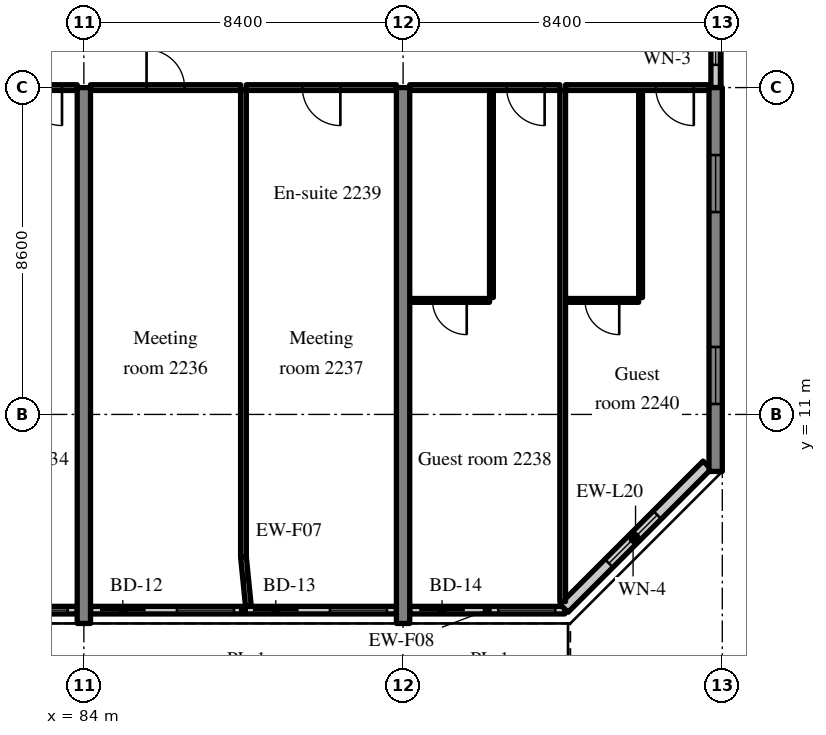
"""IFC4 building model, lengths in metres.
Left out: names, types, materials, properties, quantities, classifications, styles, units other than length and angle.
Written with IfcOpenShell. Run it as: python <this file> out.ifc"""

import sys

from ifc_helpers import new_model, si_unit, direction, frame, frame_2d, origin, place, context, subcontext, project, spatial, rectangle, extrude, source, transform, mapped, element, fill, save


model = new_model("IFC4")
c1 = context("Model", 3, precision=1e-05, world=origin(), true_north=direction((0.0, 1.0)))
c2 = subcontext(c1, "Body", "Model", "MODEL_VIEW")
j1 = project(units=[si_unit("LENGTHUNIT", "METRE"), si_unit("PLANEANGLEUNIT", "RADIAN")], contexts=[c1])
p1 = place(None, origin())
s1 = spatial("IfcSite", under=j1, at=p1, CompositionType="ELEMENT")
p2 = place(p1, origin())
s2 = spatial("IfcBuilding", under=s1, at=p2, CompositionType="ELEMENT")
p3 = place(p2, frame((0.0, 0.0, 95.2)))
s3 = spatial("IfcBuildingStorey", under=s2, at=p3, CompositionType="ELEMENT", Elevation=95.2)
m1 = source(origin(), c2, "Body", "SweptSolid", [
    extrude(rectangle(XDim=14.1, YDim=0.35, at=frame_2d((7.05, 0.0))), origin(), (0.0, 0.0, 1.0), 3.52),
])
for number, where, z_axis, x_axis in (
    (1, (84.0, 5.5, 0.0), (0.0, 0.0, 1.0), (0.0, 1.0, 0.0)),
    (2, (92.4, 5.5, 0.0), (0.0, 0.0, 1.0), (0.0, 1.0, 0.0)),
):
    element("IfcWall", number, at=place(p3, frame(where, z_axis=z_axis, x_axis=x_axis)), inside=s3, PredefinedType="SHEAR", context=c2, shape_type="MappedRepresentation", body=[
        mapped(m1, transform((0.0, 0.0, 0.0), scale=1.0)),
    ])
m2 = source(origin(), c2, "Body", "SweptSolid", [
    extrude(rectangle(XDim=10.1, YDim=0.35, at=frame_2d((5.05, 0.0))), origin(), (0.0, 0.0, 1.0), 3.52),
])
p4 = place(p3, frame((100.625, 9.5, 0.0), z_axis=(0.0, 0.0, 1.0), x_axis=(0.0, 1.0, 0.0)))
e3 = element("IfcWall", 3, at=p4, inside=s3, PredefinedType="SHEAR", context=c2, shape_type="MappedRepresentation", body=[
    mapped(m2, transform((0.0, 0.0, 0.0), scale=1.0)),
])
m3 = source(origin(), c2, "Body", "SweptSolid", [
    extrude(rectangle(XDim=1.5, YDim=1.5, at=frame_2d((0.75, 0.75))), frame((0.0, 0.185, 0.0), z_axis=(0.0, -1.0, 0.0), x_axis=(1.0, 0.0, 0.0)), (0.0, 0.0, 1.0), 0.37),
])
p5 = place(p4, frame((1.775, 0.0, 0.9)))
e4 = element("IfcOpeningElement", 4, at=p5, cuts=e3, PredefinedType="OPENING", context=c2, shape_type="MappedRepresentation", body=[
    mapped(m3, transform((0.0, 0.0, 0.0), scale=1.0)),
])
p6 = place(p4, frame((6.825, 0.0, 0.9)))
e5 = element("IfcOpeningElement", 5, at=p6, cuts=e3, PredefinedType="OPENING", context=c2, shape_type="MappedRepresentation", body=[
    mapped(m3, transform((0.0, 0.0, 0.0), scale=1.0)),
])
m4 = source(origin(), c2, "Body", "SweptSolid", [
    extrude(rectangle(XDim=8.05, YDim=0.2, at=frame_2d((4.025, 0.0))), origin(), (0.0, 0.0, 1.0), 2.82),
])
p7 = place(p3, frame((75.775, 5.85, 0.0), z_axis=(0.0, 0.0, 1.0), x_axis=(1.0, 0.0, 0.0)))
e6 = element("IfcWall", 6, at=p7, inside=s3, PredefinedType="SOLIDWALL", context=c2, shape_type="MappedRepresentation", body=[
    mapped(m4, transform((0.0, 0.0, 0.0), scale=1.0)),
])
m5 = source(origin(), c2, "Body", "SweptSolid", [
    extrude(rectangle(XDim=1.2, YDim=2.4, at=frame_2d((0.6, 1.2))), frame((0.0, 0.11, 0.0), z_axis=(0.0, -1.0, 0.0), x_axis=(1.0, 0.0, 0.0)), (0.0, 0.0, 1.0), 0.22),
])
p8 = place(p7, frame((0.25, 0.0, 0.0)))
e7 = element("IfcOpeningElement", 7, at=p8, cuts=e6, PredefinedType="OPENING", context=c2, shape_type="MappedRepresentation", body=[
    mapped(m5, transform((0.0, 0.0, 0.0), scale=1.0)),
])
m6 = source(origin(), c2, "Body", "SweptSolid", [
    extrude(rectangle(XDim=1.5, YDim=1.5, at=frame_2d((0.75, 0.75))), frame((0.0, 0.11, 0.0), z_axis=(0.0, -1.0, 0.0), x_axis=(1.0, 0.0, 0.0)), (0.0, 0.0, 1.0), 0.22),
])
p9 = place(p7, frame((2.275, 0.0, 0.9)))
e8 = element("IfcOpeningElement", 8, at=p9, cuts=e6, PredefinedType="OPENING", context=c2, shape_type="MappedRepresentation", body=[
    mapped(m6, transform((0.0, 0.0, 0.0), scale=1.0)),
])
p10 = place(p7, frame((4.275, 0.0, 0.0)))
e9 = element("IfcOpeningElement", 9, at=p10, cuts=e6, PredefinedType="OPENING", context=c2, shape_type="MappedRepresentation", body=[
    mapped(m5, transform((0.0, 0.0, 0.0), scale=1.0)),
])
p11 = place(p7, frame((6.3, 0.0, 0.9)))
e10 = element("IfcOpeningElement", 10, at=p11, cuts=e6, PredefinedType="OPENING", context=c2, shape_type="MappedRepresentation", body=[
    mapped(m6, transform((0.0, 0.0, 0.0), scale=1.0)),
])
p12 = place(p3, frame((84.175, 5.85, 0.0), z_axis=(0.0, 0.0, 1.0), x_axis=(1.0, 0.0, 0.0)))
e11 = element("IfcWall", 11, at=p12, inside=s3, PredefinedType="SOLIDWALL", context=c2, shape_type="MappedRepresentation", body=[
    mapped(m4, transform((0.0, 0.0, 0.0), scale=1.0)),
])
p13 = place(p12, frame((0.25, 0.0, 0.0)))
e12 = element("IfcOpeningElement", 12, at=p13, cuts=e11, PredefinedType="OPENING", context=c2, shape_type="MappedRepresentation", body=[
    mapped(m5, transform((0.0, 0.0, 0.0), scale=1.0)),
])
p14 = place(p12, frame((2.275, 0.0, 0.9)))
e13 = element("IfcOpeningElement", 13, at=p14, cuts=e11, PredefinedType="OPENING", context=c2, shape_type="MappedRepresentation", body=[
    mapped(m6, transform((0.0, 0.0, 0.0), scale=1.0)),
])
p15 = place(p12, frame((4.275, 0.0, 0.0)))
e14 = element("IfcOpeningElement", 14, at=p15, cuts=e11, PredefinedType="OPENING", context=c2, shape_type="MappedRepresentation", body=[
    mapped(m5, transform((0.0, 0.0, 0.0), scale=1.0)),
])
p16 = place(p12, frame((6.3, 0.0, 0.9)))
e15 = element("IfcOpeningElement", 15, at=p16, cuts=e11, PredefinedType="OPENING", context=c2, shape_type="MappedRepresentation", body=[
    mapped(m6, transform((0.0, 0.0, 0.0), scale=1.0)),
])
m7 = source(origin(), c2, "Body", "SweptSolid", [
    extrude(rectangle(XDim=4.08, YDim=0.2, at=frame_2d((2.04, 0.0))), origin(), (0.0, 0.0, 1.0), 2.82),
])
p17 = place(p3, frame((92.575, 5.85, 0.0), z_axis=(0.0, 0.0, 1.0), x_axis=(1.0, 0.0, 0.0)))
e16 = element("IfcWall", 16, at=p17, inside=s3, PredefinedType="SOLIDWALL", context=c2, shape_type="MappedRepresentation", body=[
    mapped(m7, transform((0.0, 0.0, 0.0), scale=1.0)),
])
p18 = place(p17, frame((0.25, 0.0, 0.0)))
e17 = element("IfcOpeningElement", 17, at=p18, cuts=e16, PredefinedType="OPENING", context=c2, shape_type="MappedRepresentation", body=[
    mapped(m5, transform((0.0, 0.0, 0.0), scale=1.0)),
])
p19 = place(p17, frame((2.33, 0.0, 0.9)))
e18 = element("IfcOpeningElement", 18, at=p19, cuts=e16, PredefinedType="OPENING", context=c2, shape_type="MappedRepresentation", body=[
    mapped(m6, transform((0.0, 0.0, 0.0), scale=1.0)),
])
m8 = source(origin(), c2, "Body", "SweptSolid", [
    extrude(rectangle(XDim=5.326, YDim=0.3, at=frame_2d((2.663, 0.0))), origin(), (0.0, 0.0, 1.0), 3.52),
])
p20 = place(p3, frame((96.634, 5.9, 0.0), z_axis=(0.0, 0.0, 1.0), x_axis=(0.707083859269, 0.707129702361, 0.0)))
e19 = element("IfcWall", 19, at=p20, inside=s3, PredefinedType="SOLIDWALL", context=c2, shape_type="MappedRepresentation", body=[
    mapped(m8, transform((0.0, 0.0, 0.0), scale=1.0)),
])
m9 = source(origin(), c2, "Body", "SweptSolid", [
    extrude(rectangle(XDim=1.8, YDim=1.5, at=frame_2d((0.9, 0.75))), frame((0.0, 0.16, 0.0), z_axis=(0.0, -1.0, 0.0), x_axis=(1.0, 0.0, 0.0)), (0.0, 0.0, 1.0), 0.32),
])
p21 = place(p20, frame((1.672, 0.0, 0.9)))
e20 = element("IfcOpeningElement", 20, at=p21, cuts=e19, PredefinedType="OPENING", context=c2, shape_type="MappedRepresentation", body=[
    mapped(m9, transform((0.0, 0.0, 0.0), scale=1.0)),
])
m10 = source(origin(), c2, "Body", "SweptSolid", [
    extrude(rectangle(XDim=2.4, YDim=0.25, at=frame_2d((1.2, 0.0))), origin(), (0.0, 0.0, 1.0), 2.62),
])
p22 = place(p3, frame((100.625, 19.6, 0.0), z_axis=(0.0, 0.0, 1.0), x_axis=(0.0, 1.0, 0.0)))
e21 = element("IfcWall", 21, at=p22, inside=s3, PredefinedType="SOLIDWALL", context=c2, shape_type="MappedRepresentation", body=[
    mapped(m10, transform((0.0, 0.0, 0.0), scale=1.0)),
])
m11 = source(origin(), c2, "Body", "SweptSolid", [
    extrude(rectangle(XDim=1.2, YDim=1.5, at=frame_2d((0.6, 0.75))), frame((0.0, 0.135, 0.0), z_axis=(0.0, -1.0, 0.0), x_axis=(1.0, 0.0, 0.0)), (0.0, 0.0, 1.0), 0.27),
])
p23 = place(p22, frame((0.6, 0.0, 0.9)))
e22 = element("IfcOpeningElement", 22, at=p23, cuts=e21, PredefinedType="OPENING", context=c2, shape_type="MappedRepresentation", body=[
    mapped(m11, transform((0.0, 0.0, 0.0), scale=1.0)),
])
m12 = source(origin(), c2, "Body", "SweptSolid", [
    extrude(rectangle(XDim=3.95, YDim=0.15, at=frame_2d((1.975, 0.0))), origin(), (0.0, 0.0, 1.0), 2.82),
])
p24 = place(p3, frame((79.875, 19.6, 0.0), z_axis=(0.0, 0.0, 1.0), x_axis=(1.0, 0.0, 0.0)))
e23 = element("IfcWall", 23, at=p24, inside=s3, PredefinedType="PARTITIONING", context=c2, shape_type="MappedRepresentation", body=[
    mapped(m12, transform((0.0, 0.0, 0.0), scale=1.0)),
])
m13 = source(origin(), c2, "Body", "SweptSolid", [
    extrude(rectangle(XDim=1.0, YDim=2.1, at=frame_2d((0.5, 1.05))), frame((0.0, 0.085, 0.0), z_axis=(0.0, -1.0, 0.0), x_axis=(1.0, 0.0, 0.0)), (0.0, 0.0, 1.0), 0.17),
])
p25 = place(p24, frame((2.55, 0.0, 0.0)))
e24 = element("IfcOpeningElement", 24, at=p25, cuts=e23, PredefinedType="OPENING", context=c2, shape_type="MappedRepresentation", body=[
    mapped(m13, transform((0.0, 0.0, 0.0), scale=1.0)),
])
p26 = place(p3, frame((84.175, 19.6, 0.0), z_axis=(0.0, 0.0, 1.0), x_axis=(1.0, 0.0, 0.0)))
e25 = element("IfcWall", 25, at=p26, inside=s3, PredefinedType="PARTITIONING", context=c2, shape_type="MappedRepresentation", body=[
    mapped(m12, transform((0.0, 0.0, 0.0), scale=1.0)),
])
p27 = place(p26, frame((1.475, 0.0, 0.0)))
e26 = element("IfcOpeningElement", 26, at=p27, cuts=e25, PredefinedType="OPENING", context=c2, shape_type="MappedRepresentation", body=[
    mapped(m13, transform((0.0, 0.0, 0.0), scale=1.0)),
])
m14 = source(origin(), c2, "Body", "SweptSolid", [
    extrude(rectangle(XDim=3.95, YDim=0.15, at=frame_2d((1.975, 0.0))), origin(), (0.0, 0.0, 1.0), 2.82),
])
p28 = place(p3, frame((88.275, 19.6, 0.0), z_axis=(0.0, 0.0, 1.0), x_axis=(1.0, 0.0, 0.0)))
e27 = element("IfcWall", 27, at=p28, inside=s3, PredefinedType="PARTITIONING", context=c2, shape_type="MappedRepresentation", body=[
    mapped(m14, transform((0.0, 0.0, 0.0), scale=1.0)),
])
p29 = place(p28, frame((1.475, 0.0, 0.0)))
e28 = element("IfcOpeningElement", 28, at=p29, cuts=e27, PredefinedType="OPENING", context=c2, shape_type="MappedRepresentation", body=[
    mapped(m13, transform((0.0, 0.0, 0.0), scale=1.0)),
])
m15 = source(origin(), c2, "Body", "SweptSolid", [
    extrude(rectangle(XDim=12.275, YDim=0.15, at=frame_2d((6.137, 0.0))), origin(), (0.0, 0.0, 1.0), 3.52),
])
p30 = place(p3, frame((88.2, 7.25, 0.0), z_axis=(0.0, 0.0, 1.0), x_axis=(0.0, 1.0, 0.0)))
e29 = element("IfcWall", 29, at=p30, inside=s3, PredefinedType="PARTITIONING", context=c2, shape_type="MappedRepresentation", body=[
    mapped(m15, transform((0.0, 0.0, 0.0), scale=1.0)),
])
m16 = source(origin(), c2, "Body", "SweptSolid", [
    extrude(rectangle(XDim=5.45, YDim=0.1, at=frame_2d((2.725, 0.0))), origin(), (0.0, 0.0, 1.0), 3.52),
])
p31 = place(p3, frame((94.725, 14.075, 0.0), z_axis=(0.0, 0.0, 1.0), x_axis=(0.0, 1.0, 0.0)))
e30 = element("IfcWall", 30, at=p31, inside=s3, PredefinedType="PARTITIONING", context=c2, shape_type="MappedRepresentation", body=[
    mapped(m16, transform((0.0, 0.0, 0.0), scale=1.0)),
])
m17 = source(origin(), c2, "Body", "SweptSolid", [
    extrude(rectangle(XDim=2.1, YDim=0.1, at=frame_2d((1.05, 0.0))), origin(), (0.0, 0.0, 1.0), 3.52),
])
p32 = place(p3, frame((92.575, 14.0, 0.0), z_axis=(0.0, 0.0, 1.0), x_axis=(1.0, 0.0, 0.0)))
e31 = element("IfcWall", 31, at=p32, inside=s3, PredefinedType="PARTITIONING", context=c2, shape_type="MappedRepresentation", body=[
    mapped(m17, transform((0.0, 0.0, 0.0), scale=1.0)),
])
m18 = source(origin(), c2, "Body", "SweptSolid", [
    extrude(rectangle(XDim=0.9, YDim=2.1, at=frame_2d((0.45, 1.05))), frame((0.0, 0.06, 0.0), z_axis=(0.0, -1.0, 0.0), x_axis=(1.0, 0.0, 0.0)), (0.0, 0.0, 1.0), 0.12),
])
p33 = place(p32, frame((0.6, 0.0, 0.0)))
e32 = element("IfcOpeningElement", 32, at=p33, cuts=e31, PredefinedType="OPENING", context=c2, shape_type="MappedRepresentation", body=[
    mapped(m18, transform((0.0, 0.0, 0.0), scale=1.0)),
])
p34 = place(p3, frame((92.575, 19.6, 0.0), z_axis=(0.0, 0.0, 1.0), x_axis=(1.0, 0.0, 0.0)))
e33 = element("IfcWall", 33, at=p34, inside=s3, PredefinedType="PARTITIONING", context=c2, shape_type="MappedRepresentation", body=[
    mapped(m12, transform((0.0, 0.0, 0.0), scale=1.0)),
])
p35 = place(p34, frame((2.55, 0.0, 0.0)))
e34 = element("IfcOpeningElement", 34, at=p35, cuts=e33, PredefinedType="OPENING", context=c2, shape_type="MappedRepresentation", body=[
    mapped(m13, transform((0.0, 0.0, 0.0), scale=1.0)),
])
p36 = place(p3, frame((98.65, 14.075, 0.0), z_axis=(0.0, 0.0, 1.0), x_axis=(0.0, 1.0, 0.0)))
e35 = element("IfcWall", 35, at=p36, inside=s3, PredefinedType="PARTITIONING", context=c2, shape_type="MappedRepresentation", body=[
    mapped(m16, transform((0.0, 0.0, 0.0), scale=1.0)),
])
m19 = source(origin(), c2, "Body", "SweptSolid", [
    extrude(rectangle(XDim=1.925, YDim=0.1, at=frame_2d((0.962, 0.0))), origin(), (0.0, 0.0, 1.0), 3.52),
])
p37 = place(p3, frame((96.675, 14.0, 0.0), z_axis=(0.0, 0.0, 1.0), x_axis=(1.0, 0.0, 0.0)))
e36 = element("IfcWall", 36, at=p37, inside=s3, PredefinedType="PARTITIONING", context=c2, shape_type="MappedRepresentation", body=[
    mapped(m19, transform((0.0, 0.0, 0.0), scale=1.0)),
])
p38 = place(p37, frame((0.513, 0.0, 0.0)))
e37 = element("IfcOpeningElement", 37, at=p38, cuts=e36, PredefinedType="OPENING", context=c2, shape_type="MappedRepresentation", body=[
    mapped(m18, transform((0.0, 0.0, 0.0), scale=1.0)),
])
m20 = source(origin(), c2, "Body", "SweptSolid", [
    extrude(rectangle(XDim=3.775, YDim=0.15, at=frame_2d((1.887, 0.0))), origin(), (0.0, 0.0, 1.0), 2.82),
])
p39 = place(p3, frame((96.675, 19.6, 0.0), z_axis=(0.0, 0.0, 1.0), x_axis=(1.0, 0.0, 0.0)))
e38 = element("IfcWall", 38, at=p39, inside=s3, PredefinedType="PARTITIONING", context=c2, shape_type="MappedRepresentation", body=[
    mapped(m20, transform((0.0, 0.0, 0.0), scale=1.0)),
])
p40 = place(p39, frame((2.375, 0.0, 0.0)))
e39 = element("IfcOpeningElement", 39, at=p40, cuts=e38, PredefinedType="OPENING", context=c2, shape_type="MappedRepresentation", body=[
    mapped(m13, transform((0.0, 0.0, 0.0), scale=1.0)),
])
m21 = source(origin(), c2, "Body", "SweptSolid", [
    extrude(rectangle(XDim=13.447, YDim=0.15, at=frame_2d((6.724, 0.0))), origin(), (0.0, 0.0, 1.0), 3.52),
])
p41 = place(p3, frame((96.6, 6.078, 0.0), z_axis=(0.0, 0.0, 1.0), x_axis=(0.0, 1.0, 0.0)))
e40 = element("IfcWall", 40, at=p41, inside=s3, PredefinedType="PARTITIONING", context=c2, shape_type="MappedRepresentation", body=[
    mapped(m21, transform((0.0, 0.0, 0.0), scale=1.0)),
])
m22 = source(origin(), c2, "Body", "SweptSolid", [
    extrude(rectangle(XDim=1.307, YDim=0.15, at=frame_2d((0.653, 0.0))), origin(), (0.0, 0.0, 1.0), 3.52),
])
p42 = place(p3, frame((88.33, 5.95, 0.0), z_axis=(0.0, 0.0, 1.0), x_axis=(-0.099596223396, 0.99502793543, 0.0)))
e41 = element("IfcWall", 41, at=p42, inside=s3, PredefinedType="PARTITIONING", context=c2, shape_type="MappedRepresentation", body=[
    mapped(m22, transform((0.0, 0.0, 0.0), scale=1.0)),
])
m23 = source(origin(), c2, "Body", "SweptSolid", [
    extrude(rectangle(XDim=1.5, YDim=1.5, at=frame_2d((0.75, 0.75))), frame((0.0, 0.03, 0.0), z_axis=(0.0, -1.0, 0.0), x_axis=(1.0, 0.0, 0.0)), (0.0, 0.0, 1.0), 0.06),
])
p43 = place(p11, origin())
e42 = element("IfcWindow", 42, at=p43, inside=s3, PartitioningType="SINGLE_PANEL", PredefinedType="WINDOW", context=c2, shape_type="MappedRepresentation", body=[
    mapped(m23, transform((0.0, 0.0, 0.0), scale=1.0)),
])
fill(e10, e42)
m24 = source(origin(), c2, "Body", "SweptSolid", [
    extrude(rectangle(XDim=1.2, YDim=2.4, at=frame_2d((0.6, 1.2))), frame((0.0, 0.025, 0.0), z_axis=(0.0, -1.0, 0.0), x_axis=(1.0, 0.0, 0.0)), (0.0, 0.0, 1.0), 0.05),
])
p44 = place(p13, origin())
e43 = element("IfcDoor", 43, at=p44, inside=s3, OperationType="SLIDING_TO_RIGHT", PredefinedType="DOOR", context=c2, shape_type="MappedRepresentation", body=[
    mapped(m24, transform((0.0, 0.0, 0.0), scale=1.0)),
])
fill(e12, e43)
p45 = place(p14, origin())
e44 = element("IfcWindow", 44, at=p45, inside=s3, PartitioningType="SINGLE_PANEL", PredefinedType="WINDOW", context=c2, shape_type="MappedRepresentation", body=[
    mapped(m23, transform((0.0, 0.0, 0.0), scale=1.0)),
])
fill(e13, e44)
p46 = place(p15, origin())
e45 = element("IfcDoor", 45, at=p46, inside=s3, OperationType="SLIDING_TO_LEFT", PredefinedType="DOOR", context=c2, shape_type="MappedRepresentation", body=[
    mapped(m24, transform((0.0, 0.0, 0.0), scale=1.0)),
])
fill(e14, e45)
p47 = place(p16, origin())
e46 = element("IfcWindow", 46, at=p47, inside=s3, PartitioningType="SINGLE_PANEL", PredefinedType="WINDOW", context=c2, shape_type="MappedRepresentation", body=[
    mapped(m23, transform((0.0, 0.0, 0.0), scale=1.0)),
])
fill(e15, e46)
p48 = place(p18, origin())
e47 = element("IfcDoor", 47, at=p48, inside=s3, OperationType="SLIDING_TO_RIGHT", PredefinedType="DOOR", context=c2, shape_type="MappedRepresentation", body=[
    mapped(m24, transform((0.0, 0.0, 0.0), scale=1.0)),
])
fill(e17, e47)
p49 = place(p19, origin())
e48 = element("IfcWindow", 48, at=p49, inside=s3, PartitioningType="SINGLE_PANEL", PredefinedType="WINDOW", context=c2, shape_type="MappedRepresentation", body=[
    mapped(m23, transform((0.0, 0.0, 0.0), scale=1.0)),
])
fill(e18, e48)
m25 = source(origin(), c2, "Body", "SweptSolid", [
    extrude(rectangle(XDim=1.8, YDim=1.5, at=frame_2d((0.9, 0.75))), frame((0.0, 0.03, 0.0), z_axis=(0.0, -1.0, 0.0), x_axis=(1.0, 0.0, 0.0)), (0.0, 0.0, 1.0), 0.06),
])
p50 = place(p21, origin())
e49 = element("IfcWindow", 49, at=p50, inside=s3, PartitioningType="SINGLE_PANEL", PredefinedType="WINDOW", context=c2, shape_type="MappedRepresentation", body=[
    mapped(m25, transform((0.0, 0.0, 0.0), scale=1.0)),
])
fill(e20, e49)
p51 = place(p5, origin())
e50 = element("IfcWindow", 50, at=p51, inside=s3, PartitioningType="SINGLE_PANEL", PredefinedType="WINDOW", context=c2, shape_type="MappedRepresentation", body=[
    mapped(m23, transform((0.0, 0.0, 0.0), scale=1.0)),
])
fill(e4, e50)
p52 = place(p6, origin())
e51 = element("IfcWindow", 51, at=p52, inside=s3, PartitioningType="SINGLE_PANEL", PredefinedType="WINDOW", context=c2, shape_type="MappedRepresentation", body=[
    mapped(m23, transform((0.0, 0.0, 0.0), scale=1.0)),
])
fill(e5, e51)
m26 = source(origin(), c2, "Body", "SweptSolid", [
    extrude(rectangle(XDim=1.2, YDim=1.5, at=frame_2d((0.6, 0.75))), frame((0.0, 0.03, 0.0), z_axis=(0.0, -1.0, 0.0), x_axis=(1.0, 0.0, 0.0)), (0.0, 0.0, 1.0), 0.06),
])
p53 = place(p23, origin())
e52 = element("IfcWindow", 52, at=p53, inside=s3, PartitioningType="SINGLE_PANEL", PredefinedType="WINDOW", context=c2, shape_type="MappedRepresentation", body=[
    mapped(m26, transform((0.0, 0.0, 0.0), scale=1.0)),
])
fill(e22, e52)
m27 = source(origin(), c2, "Body", "SweptSolid", [
    extrude(rectangle(XDim=1.0, YDim=2.1, at=frame_2d((0.5, 1.05))), frame((0.0, 0.025, 0.0), z_axis=(0.0, -1.0, 0.0), x_axis=(1.0, 0.0, 0.0)), (0.0, 0.0, 1.0), 0.05),
])
p54 = place(p25, origin())
e53 = element("IfcDoor", 53, at=p54, inside=s3, OperationType="SINGLE_SWING_RIGHT", PredefinedType="DOOR", context=c2, shape_type="MappedRepresentation", body=[
    mapped(m27, transform((0.0, 0.0, 0.0), scale=1.0)),
])
fill(e24, e53)
p55 = place(p27, origin())
e54 = element("IfcDoor", 54, at=p55, inside=s3, OperationType="SINGLE_SWING_LEFT", PredefinedType="DOOR", context=c2, shape_type="MappedRepresentation", body=[
    mapped(m27, transform((0.0, 0.0, 0.0), scale=1.0)),
])
fill(e26, e54)
p56 = place(p29, origin())
e55 = element("IfcDoor", 55, at=p56, inside=s3, OperationType="SINGLE_SWING_RIGHT", PredefinedType="DOOR", context=c2, shape_type="MappedRepresentation", body=[
    mapped(m27, transform((0.0, 0.0, 0.0), scale=1.0)),
])
fill(e28, e55)
m28 = source(origin(), c2, "Body", "SweptSolid", [
    extrude(rectangle(XDim=0.9, YDim=2.1, at=frame_2d((0.45, 1.05))), frame((0.0, 0.025, 0.0), z_axis=(0.0, -1.0, 0.0), x_axis=(1.0, 0.0, 0.0)), (0.0, 0.0, 1.0), 0.05),
])
p57 = place(p33, origin())
e56 = element("IfcDoor", 56, at=p57, inside=s3, OperationType="SINGLE_SWING_RIGHT", PredefinedType="DOOR", context=c2, shape_type="MappedRepresentation", body=[
    mapped(m28, transform((0.0, 0.0, 0.0), scale=1.0)),
])
fill(e32, e56)
p58 = place(p35, origin())
e57 = element("IfcDoor", 57, at=p58, inside=s3, OperationType="SINGLE_SWING_RIGHT", PredefinedType="DOOR", context=c2, shape_type="MappedRepresentation", body=[
    mapped(m27, transform((0.0, 0.0, 0.0), scale=1.0)),
])
fill(e34, e57)
p59 = place(p38, origin())
e58 = element("IfcDoor", 58, at=p59, inside=s3, OperationType="SINGLE_SWING_RIGHT", PredefinedType="DOOR", context=c2, shape_type="MappedRepresentation", body=[
    mapped(m28, transform((0.0, 0.0, 0.0), scale=1.0)),
])
fill(e37, e58)
p60 = place(p40, origin())
e59 = element("IfcDoor", 59, at=p60, inside=s3, OperationType="SINGLE_SWING_RIGHT", PredefinedType="DOOR", context=c2, shape_type="MappedRepresentation", body=[
    mapped(m27, transform((0.0, 0.0, 0.0), scale=1.0)),
])
fill(e39, e59)
save(model, sys.argv[1])
